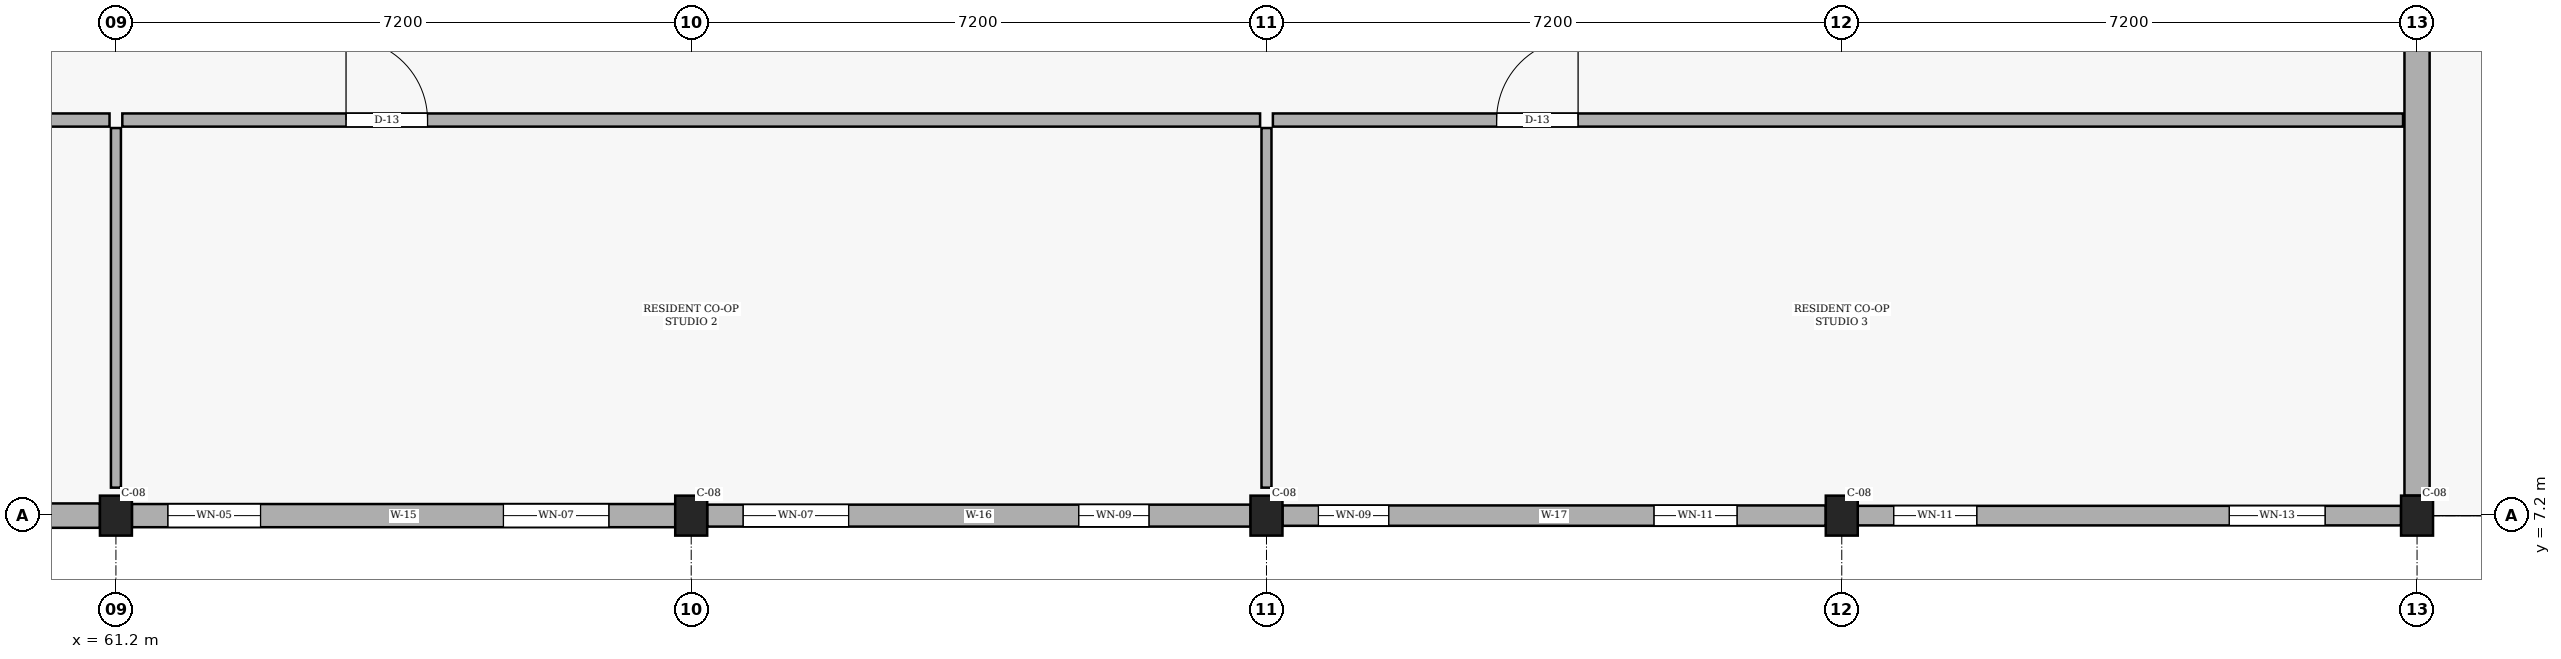
"""IFC4 building model, lengths in metres.
Left out: names, types, materials, properties, quantities, classifications, styles, units other than length and angle.
Written with IfcOpenShell. Run it as: python <this file> out.ifc"""

import sys

from ifc_helpers import new_model, si_unit, direction, frame, frame_2d, origin, origin_2d, place, context, subcontext, project, spatial, rectangle, extrude, element, fill, save


model = new_model("IFC4")
c1 = context("Model", 3, precision=1e-05, world=origin(), true_north=direction((0.0, 1.0)))
c2 = subcontext(c1, "Body", "Model", "MODEL_VIEW")
j1 = project(units=[si_unit("LENGTHUNIT", "METRE"), si_unit("PLANEANGLEUNIT", "RADIAN")], contexts=[c1])
p1 = place(None, origin())
s1 = spatial("IfcSite", under=j1, at=p1, CompositionType="ELEMENT")
p2 = place(p1, origin())
s2 = spatial("IfcBuilding", under=s1, at=p2, CompositionType="ELEMENT")
p3 = place(p2, frame((0.0, 0.0, 4.5)))
s3 = spatial("IfcBuildingStorey", under=s2, at=p3, CompositionType="ELEMENT", Elevation=4.5)
for number, where, z_axis, x_axis in (
    (1, (61.2, 7.2, 0.0), (0.0, 0.0, 1.0), (1.0, 0.0, 0.0)),
    (2, (68.4, 7.2, 0.0), (0.0, 0.0, 1.0), (1.0, 0.0, 0.0)),
    (3, (75.6, 7.2, 0.0), (0.0, 0.0, 1.0), (1.0, 0.0, 0.0)),
    (4, (82.8, 7.2, 0.0), (0.0, 0.0, 1.0), (1.0, 0.0, 0.0)),
    (5, (90.0, 7.2, 0.0), (0.0, 0.0, 1.0), (1.0, 0.0, 0.0)),
):
    element("IfcColumn", number, at=place(p3, frame(where, z_axis=z_axis, x_axis=x_axis)), inside=s3, PredefinedType="COLUMN", context=c2, shape_type="SweptSolid", body=[
        extrude(rectangle(XDim=0.4, YDim=0.5, at=origin_2d()), origin(), (0.0, 0.0, 1.0), 3.15),
    ])
p4 = place(p3, frame((54.2, 7.2, 0.0), z_axis=(0.0, 0.0, 1.0), x_axis=(1.0, 0.0, 0.0)))
e6 = element("IfcWall", 6, at=p4, inside=s3, PredefinedType="SOLIDWALL", context=c2, shape_type="SweptSolid", body=[
    extrude(rectangle(XDim=6.8, YDim=0.305, at=frame_2d((3.4, 0.0))), origin(), (0.0, 0.0, 1.0), 2.34),
])
p5 = place(p4, frame((0.45, 0.0, 0.78)))
e7 = element("IfcOpeningElement", 7, at=p5, cuts=e6, PredefinedType="OPENING", context=c2, shape_type="SweptSolid", body=[
    extrude(rectangle(XDim=1.0, YDim=1.15, at=frame_2d((0.5, 0.575))), frame((0.0, 0.163, 0.0), z_axis=(0.0, -1.0, 0.0), x_axis=(1.0, 0.0, 0.0)), (0.0, 0.0, 1.0), 0.325),
])
p6 = place(p4, frame((4.65, 0.0, 0.78)))
e8 = element("IfcOpeningElement", 8, at=p6, cuts=e6, PredefinedType="OPENING", context=c2, shape_type="SweptSolid", body=[
    extrude(rectangle(XDim=1.16, YDim=1.15, at=frame_2d((0.58, 0.575))), frame((0.0, 0.163, 0.0), z_axis=(0.0, -1.0, 0.0), x_axis=(1.0, 0.0, 0.0)), (0.0, 0.0, 1.0), 0.325),
])
p7 = place(p3, frame((61.4, 7.2, 0.0), z_axis=(0.0, 0.0, 1.0), x_axis=(1.0, 0.0, 0.0)))
e9 = element("IfcWall", 9, at=p7, inside=s3, PredefinedType="SOLIDWALL", context=c2, shape_type="SweptSolid", body=[
    extrude(rectangle(XDim=6.8, YDim=0.29, at=frame_2d((3.4, 0.0))), origin(), (0.0, 0.0, 1.0), 2.34),
])
p8 = place(p7, frame((0.45, 0.0, 0.78)))
e10 = element("IfcOpeningElement", 10, at=p8, cuts=e9, PredefinedType="OPENING", context=c2, shape_type="SweptSolid", body=[
    extrude(rectangle(XDim=1.16, YDim=1.15, at=frame_2d((0.58, 0.575))), frame((0.0, 0.155, 0.0), z_axis=(0.0, -1.0, 0.0), x_axis=(1.0, 0.0, 0.0)), (0.0, 0.0, 1.0), 0.31),
])
p9 = place(p7, frame((4.65, 0.0, 0.78)))
e11 = element("IfcOpeningElement", 11, at=p9, cuts=e9, PredefinedType="OPENING", context=c2, shape_type="SweptSolid", body=[
    extrude(rectangle(XDim=1.32, YDim=1.15, at=frame_2d((0.66, 0.575))), frame((0.0, 0.155, 0.0), z_axis=(0.0, -1.0, 0.0), x_axis=(1.0, 0.0, 0.0)), (0.0, 0.0, 1.0), 0.31),
])
p10 = place(p3, frame((68.6, 7.2, 0.0), z_axis=(0.0, 0.0, 1.0), x_axis=(1.0, 0.0, 0.0)))
e12 = element("IfcWall", 12, at=p10, inside=s3, PredefinedType="SOLIDWALL", context=c2, shape_type="SweptSolid", body=[
    extrude(rectangle(XDim=6.8, YDim=0.275, at=frame_2d((3.4, 0.0))), origin(), (0.0, 0.0, 1.0), 2.34),
])
p11 = place(p10, frame((0.45, 0.0, 0.78)))
e13 = element("IfcOpeningElement", 13, at=p11, cuts=e12, PredefinedType="OPENING", context=c2, shape_type="SweptSolid", body=[
    extrude(rectangle(XDim=1.32, YDim=1.15, at=frame_2d((0.66, 0.575))), frame((0.0, 0.147, 0.0), z_axis=(0.0, -1.0, 0.0), x_axis=(1.0, 0.0, 0.0)), (0.0, 0.0, 1.0), 0.295),
])
p12 = place(p10, frame((4.65, 0.0, 0.78)))
e14 = element("IfcOpeningElement", 14, at=p12, cuts=e12, PredefinedType="OPENING", context=c2, shape_type="SweptSolid", body=[
    extrude(rectangle(XDim=0.88, YDim=1.26, at=frame_2d((0.44, 0.63))), frame((0.0, 0.147, 0.0), z_axis=(0.0, -1.0, 0.0), x_axis=(1.0, 0.0, 0.0)), (0.0, 0.0, 1.0), 0.295),
])
p13 = place(p3, frame((75.8, 7.2, 0.0), z_axis=(0.0, 0.0, 1.0), x_axis=(1.0, 0.0, 0.0)))
e15 = element("IfcWall", 15, at=p13, inside=s3, PredefinedType="SOLIDWALL", context=c2, shape_type="SweptSolid", body=[
    extrude(rectangle(XDim=6.8, YDim=0.255, at=frame_2d((3.4, 0.0))), origin(), (0.0, 0.0, 1.0), 2.34),
])
p14 = place(p13, frame((0.45, 0.0, 0.78)))
e16 = element("IfcOpeningElement", 16, at=p14, cuts=e15, PredefinedType="OPENING", context=c2, shape_type="SweptSolid", body=[
    extrude(rectangle(XDim=0.88, YDim=1.26, at=frame_2d((0.44, 0.63))), frame((0.0, 0.137, 0.0), z_axis=(0.0, -1.0, 0.0), x_axis=(1.0, 0.0, 0.0)), (0.0, 0.0, 1.0), 0.275),
])
p15 = place(p13, frame((4.65, 0.0, 0.78)))
e17 = element("IfcOpeningElement", 17, at=p15, cuts=e15, PredefinedType="OPENING", context=c2, shape_type="SweptSolid", body=[
    extrude(rectangle(XDim=1.04, YDim=1.26, at=frame_2d((0.52, 0.63))), frame((0.0, 0.137, 0.0), z_axis=(0.0, -1.0, 0.0), x_axis=(1.0, 0.0, 0.0)), (0.0, 0.0, 1.0), 0.275),
])
p16 = place(p3, frame((83.0, 7.2, 0.0), z_axis=(0.0, 0.0, 1.0), x_axis=(1.0, 0.0, 0.0)))
e18 = element("IfcWall", 18, at=p16, inside=s3, PredefinedType="SOLIDWALL", context=c2, shape_type="SweptSolid", body=[
    extrude(rectangle(XDim=6.8, YDim=0.245, at=frame_2d((3.4, 0.0))), origin(), (0.0, 0.0, 1.0), 2.34),
])
p17 = place(p16, frame((0.45, 0.0, 0.78)))
e19 = element("IfcOpeningElement", 19, at=p17, cuts=e18, PredefinedType="OPENING", context=c2, shape_type="SweptSolid", body=[
    extrude(rectangle(XDim=1.04, YDim=1.26, at=frame_2d((0.52, 0.63))), frame((0.0, 0.133, 0.0), z_axis=(0.0, -1.0, 0.0), x_axis=(1.0, 0.0, 0.0)), (0.0, 0.0, 1.0), 0.265),
])
p18 = place(p16, frame((4.65, 0.0, 0.78)))
e20 = element("IfcOpeningElement", 20, at=p18, cuts=e18, PredefinedType="OPENING", context=c2, shape_type="SweptSolid", body=[
    extrude(rectangle(XDim=1.2, YDim=1.26, at=frame_2d((0.6, 0.63))), frame((0.0, 0.133, 0.0), z_axis=(0.0, -1.0, 0.0), x_axis=(1.0, 0.0, 0.0)), (0.0, 0.0, 1.0), 0.265),
])
p19 = place(p3, frame((90.0, 7.45, 0.0), z_axis=(0.0, 0.0, 1.0), x_axis=(0.0, 1.0, 0.0)))
e21 = element("IfcWall", 21, at=p19, inside=s3, PredefinedType="SOLIDWALL", context=c2, shape_type="SweptSolid", body=[
    extrude(rectangle(XDim=6.7, YDim=0.315, at=frame_2d((3.35, 0.0))), origin(), (0.0, 0.0, 1.0), 2.34),
])
p20 = place(p3, frame((46.975, 12.15, 0.0), z_axis=(0.0, 0.0, 1.0), x_axis=(1.0, 0.0, 0.0)))
e22 = element("IfcWall", 22, at=p20, inside=s3, PredefinedType="PARTITIONING", context=c2, shape_type="SweptSolid", body=[
    extrude(rectangle(XDim=14.145, YDim=0.165, at=frame_2d((7.073, 0.0))), origin(), (0.0, 0.0, 1.0), 2.29),
])
p21 = place(p20, frame((2.8, 0.0, 0.0)))
e23 = element("IfcOpeningElement", 23, at=p21, cuts=e22, PredefinedType="OPENING", context=c2, shape_type="SweptSolid", body=[
    extrude(rectangle(XDim=1.02, YDim=2.15, at=frame_2d((0.51, 1.075))), frame((0.0, 0.093, 0.0), z_axis=(0.0, -1.0, 0.0), x_axis=(1.0, 0.0, 0.0)), (0.0, 0.0, 1.0), 0.185),
])
p22 = place(p3, frame((61.28, 12.15, 0.0), z_axis=(0.0, 0.0, 1.0), x_axis=(1.0, 0.0, 0.0)))
e24 = element("IfcWall", 24, at=p22, inside=s3, PredefinedType="PARTITIONING", context=c2, shape_type="SweptSolid", body=[
    extrude(rectangle(XDim=14.24, YDim=0.165, at=frame_2d((7.12, 0.0))), origin(), (0.0, 0.0, 1.0), 2.29),
])
p23 = place(p22, frame((2.8, 0.0, 0.0)))
e25 = element("IfcOpeningElement", 25, at=p23, cuts=e24, PredefinedType="OPENING", context=c2, shape_type="SweptSolid", body=[
    extrude(rectangle(XDim=1.02, YDim=2.15, at=frame_2d((0.51, 1.075))), frame((0.0, 0.093, 0.0), z_axis=(0.0, -1.0, 0.0), x_axis=(1.0, 0.0, 0.0)), (0.0, 0.0, 1.0), 0.185),
])
p24 = place(p3, frame((75.68, 12.15, 0.0), z_axis=(0.0, 0.0, 1.0), x_axis=(1.0, 0.0, 0.0)))
e26 = element("IfcWall", 26, at=p24, inside=s3, PredefinedType="PARTITIONING", context=c2, shape_type="SweptSolid", body=[
    extrude(rectangle(XDim=14.145, YDim=0.165, at=frame_2d((7.073, 0.0))), origin(), (0.0, 0.0, 1.0), 2.29),
])
p25 = place(p24, frame((2.8, 0.0, 0.0)))
e27 = element("IfcOpeningElement", 27, at=p25, cuts=e26, PredefinedType="OPENING", context=c2, shape_type="SweptSolid", body=[
    extrude(rectangle(XDim=1.02, YDim=2.15, at=frame_2d((0.51, 1.075))), frame((0.0, 0.093, 0.0), z_axis=(0.0, -1.0, 0.0), x_axis=(1.0, 0.0, 0.0)), (0.0, 0.0, 1.0), 0.185),
])
for number, where, z_axis, x_axis in (
    (28, (61.2, 7.55, 0.0), (0.0, 0.0, 1.0), (0.0, 1.0, 0.0)),
    (29, (75.6, 7.55, 0.0), (0.0, 0.0, 1.0), (0.0, 1.0, 0.0)),
):
    element("IfcWall", number, at=place(p3, frame(where, z_axis=z_axis, x_axis=x_axis)), inside=s3, PredefinedType="PARTITIONING", context=c2, shape_type="SweptSolid", body=[
        extrude(rectangle(XDim=4.5, YDim=0.125, at=frame_2d((2.25, 0.0))), origin(), (0.0, 0.0, 1.0), 2.29),
    ])
p26 = place(p8, origin())
e30 = element("IfcWindow", 30, at=p26, inside=s3, PartitioningType="SINGLE_PANEL", PredefinedType="WINDOW", context=c2, shape_type="SweptSolid", body=[
    extrude(rectangle(XDim=1.16, YDim=1.15, at=frame_2d((0.58, 0.575))), frame((0.0, 0.03, 0.0), z_axis=(0.0, -1.0, 0.0), x_axis=(1.0, 0.0, 0.0)), (0.0, 0.0, 1.0), 0.06),
])
fill(e10, e30)
p27 = place(p9, origin())
e31 = element("IfcWindow", 31, at=p27, inside=s3, PartitioningType="SINGLE_PANEL", PredefinedType="WINDOW", context=c2, shape_type="SweptSolid", body=[
    extrude(rectangle(XDim=1.32, YDim=1.15, at=frame_2d((0.66, 0.575))), frame((0.0, 0.03, 0.0), z_axis=(0.0, -1.0, 0.0), x_axis=(1.0, 0.0, 0.0)), (0.0, 0.0, 1.0), 0.06),
])
fill(e11, e31)
p28 = place(p11, origin())
e32 = element("IfcWindow", 32, at=p28, inside=s3, PartitioningType="SINGLE_PANEL", PredefinedType="WINDOW", context=c2, shape_type="SweptSolid", body=[
    extrude(rectangle(XDim=1.32, YDim=1.15, at=frame_2d((0.66, 0.575))), frame((0.0, 0.03, 0.0), z_axis=(0.0, -1.0, 0.0), x_axis=(1.0, 0.0, 0.0)), (0.0, 0.0, 1.0), 0.06),
])
fill(e13, e32)
p29 = place(p12, origin())
e33 = element("IfcWindow", 33, at=p29, inside=s3, PartitioningType="SINGLE_PANEL", PredefinedType="WINDOW", context=c2, shape_type="SweptSolid", body=[
    extrude(rectangle(XDim=0.88, YDim=1.26, at=frame_2d((0.44, 0.63))), frame((0.0, 0.03, 0.0), z_axis=(0.0, -1.0, 0.0), x_axis=(1.0, 0.0, 0.0)), (0.0, 0.0, 1.0), 0.06),
])
fill(e14, e33)
p30 = place(p14, origin())
e34 = element("IfcWindow", 34, at=p30, inside=s3, PartitioningType="SINGLE_PANEL", PredefinedType="WINDOW", context=c2, shape_type="SweptSolid", body=[
    extrude(rectangle(XDim=0.88, YDim=1.26, at=frame_2d((0.44, 0.63))), frame((0.0, 0.03, 0.0), z_axis=(0.0, -1.0, 0.0), x_axis=(1.0, 0.0, 0.0)), (0.0, 0.0, 1.0), 0.06),
])
fill(e16, e34)
p31 = place(p15, origin())
e35 = element("IfcWindow", 35, at=p31, inside=s3, PartitioningType="SINGLE_PANEL", PredefinedType="WINDOW", context=c2, shape_type="SweptSolid", body=[
    extrude(rectangle(XDim=1.04, YDim=1.26, at=frame_2d((0.52, 0.63))), frame((0.0, 0.03, 0.0), z_axis=(0.0, -1.0, 0.0), x_axis=(1.0, 0.0, 0.0)), (0.0, 0.0, 1.0), 0.06),
])
fill(e17, e35)
p32 = place(p17, origin())
e36 = element("IfcWindow", 36, at=p32, inside=s3, PartitioningType="SINGLE_PANEL", PredefinedType="WINDOW", context=c2, shape_type="SweptSolid", body=[
    extrude(rectangle(XDim=1.04, YDim=1.26, at=frame_2d((0.52, 0.63))), frame((0.0, 0.03, 0.0), z_axis=(0.0, -1.0, 0.0), x_axis=(1.0, 0.0, 0.0)), (0.0, 0.0, 1.0), 0.06),
])
fill(e19, e36)
p33 = place(p18, origin())
e37 = element("IfcWindow", 37, at=p33, inside=s3, PartitioningType="SINGLE_PANEL", PredefinedType="WINDOW", context=c2, shape_type="SweptSolid", body=[
    extrude(rectangle(XDim=1.2, YDim=1.26, at=frame_2d((0.6, 0.63))), frame((0.0, 0.03, 0.0), z_axis=(0.0, -1.0, 0.0), x_axis=(1.0, 0.0, 0.0)), (0.0, 0.0, 1.0), 0.06),
])
fill(e20, e37)
p34 = place(p23, origin())
e38 = element("IfcDoor", 38, at=p34, inside=s3, OperationType="SINGLE_SWING_LEFT", PredefinedType="DOOR", context=c2, shape_type="SweptSolid", body=[
    extrude(rectangle(XDim=1.02, YDim=2.15, at=frame_2d((0.51, 1.075))), frame((0.0, 0.025, 0.0), z_axis=(0.0, -1.0, 0.0), x_axis=(1.0, 0.0, 0.0)), (0.0, 0.0, 1.0), 0.05),
])
fill(e25, e38)
p35 = place(p25, origin())
e39 = element("IfcDoor", 39, at=p35, inside=s3, OperationType="SINGLE_SWING_RIGHT", PredefinedType="DOOR", context=c2, shape_type="SweptSolid", body=[
    extrude(rectangle(XDim=1.02, YDim=2.15, at=frame_2d((0.51, 1.075))), frame((0.0, 0.025, 0.0), z_axis=(0.0, -1.0, 0.0), x_axis=(1.0, 0.0, 0.0)), (0.0, 0.0, 1.0), 0.05),
])
fill(e27, e39)
save(model, sys.argv[1])
